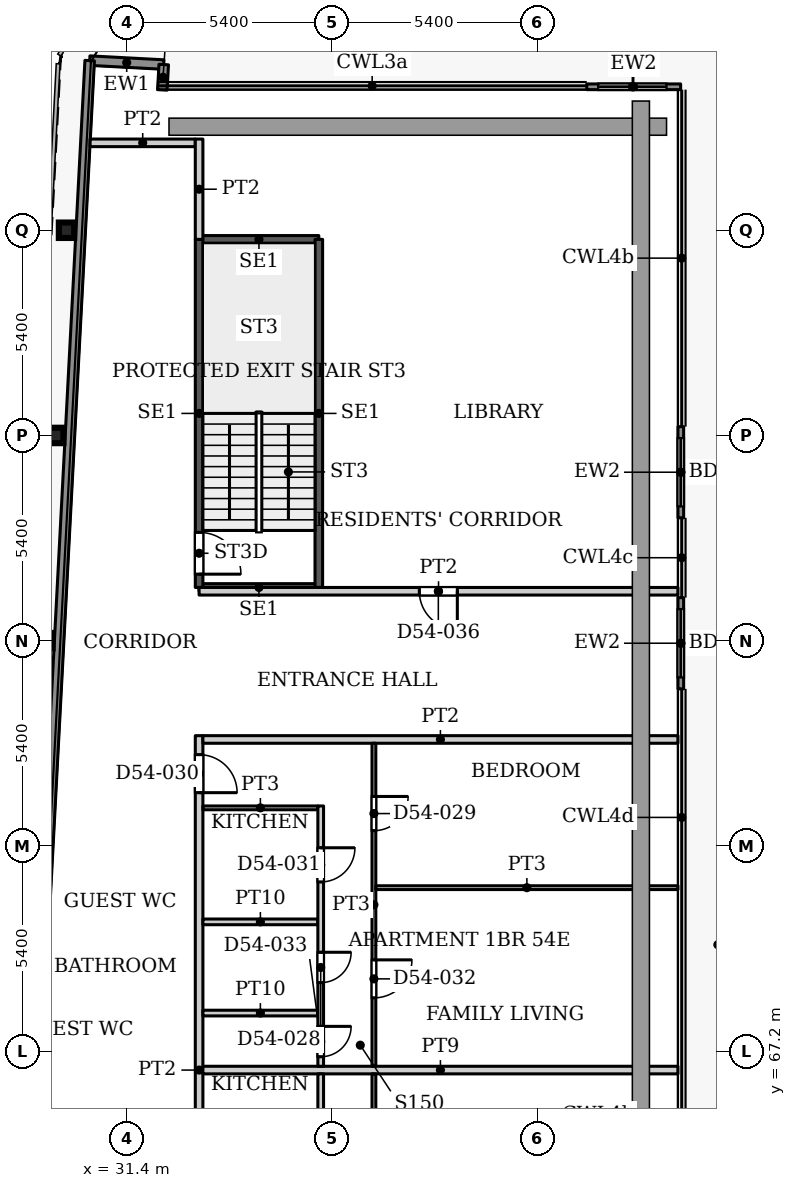
"""IFC4 building model, lengths in metres.
Left out: names, types, materials, properties, quantities, classifications, styles, units other than length and angle.
Written with IfcOpenShell. Run it as: python <this file> out.ifc"""

import sys

from ifc_helpers import new_model, si_unit, direction, frame, frame_2d, origin, origin_2d, place, context, subcontext, project, spatial, rectangle, i_section, extrude, source, transform, mapped, element, fill, save


model = new_model("IFC4")
c1 = context("Model", 3, precision=1e-05, world=origin(), true_north=direction((0.0, 1.0)))
c2 = subcontext(c1, "Body", "Model", "MODEL_VIEW")
j1 = project(units=[si_unit("LENGTHUNIT", "METRE"), si_unit("PLANEANGLEUNIT", "RADIAN")], contexts=[c1])
p1 = place(None, origin())
s1 = spatial("IfcSite", under=j1, at=p1, CompositionType="ELEMENT")
p2 = place(p1, origin())
s2 = spatial("IfcBuilding", under=s1, at=p2, CompositionType="ELEMENT")
p3 = place(p2, frame((0.0, 0.0, 231.8)))
s3 = spatial("IfcBuildingStorey", under=s2, at=p3, CompositionType="ELEMENT", Elevation=231.8)
for number, where, z_axis, x_axis in (
    (1, (29.243, 78.0, 0.0), (0.0, 0.0, 1.0), (1.0, 0.0, 0.0)),
    (2, (29.527, 83.4, 0.0), (0.0, 0.0, 1.0), (1.0, 0.0, 0.0)),
    (3, (29.811, 88.8, 0.0), (0.0, 0.0, 1.0), (1.0, 0.0, 0.0)),
):
    element("IfcColumn", number, at=place(p3, frame(where, z_axis=z_axis, x_axis=x_axis)), inside=s3, PredefinedType="COLUMN", context=c2, shape_type="SweptSolid", body=[
        extrude(i_section(OverallWidth=0.404, OverallDepth=0.407, WebThickness=0.027, FlangeThickness=0.044, FilletRadius=0.012, at=origin_2d()), origin(), (0.0, 0.0, 1.0), 3.9),
    ])
p4 = place(p3, frame((30.421, 93.264, 0.0), z_axis=(0.0, 0.0, 1.0), x_axis=(0.998577785791, -0.053314216913, 0.0)))
e4 = element("IfcWall", 4, at=p4, inside=s3, PredefinedType="SOLIDWALL", context=c2, shape_type="SweptSolid", body=[
    extrude(rectangle(XDim=1.951, YDim=0.25, at=frame_2d((0.975, 0.0))), origin(), (0.0, 0.0, 1.0), 3.75),
])
p5 = place(p3, frame((32.369, 93.16, 0.0), z_axis=(0.0, 0.0, 1.0), x_axis=(-0.053729014033, -0.998555553312, 0.0)))
e5 = element("IfcWall", 5, at=p5, inside=s3, PredefinedType="SOLIDWALL", context=c2, shape_type="SweptSolid", body=[
    extrude(rectangle(XDim=0.668, YDim=0.25, at=frame_2d((0.334, 0.0))), origin(), (0.0, 0.0, 1.0), 3.75),
])
p6 = place(p3, frame((43.5, 92.575, 0.0), z_axis=(0.0, 0.0, 1.0), x_axis=(1.0, 0.0, 0.0)))
e6 = element("IfcWall", 6, at=p6, inside=s3, PredefinedType="SOLIDWALL", context=c2, shape_type="SweptSolid", body=[
    extrude(rectangle(XDim=2.471, YDim=0.15, at=frame_2d((1.235, 0.0))), origin(), (0.0, 0.0, 1.0), 3.75),
])
p7 = place(p6, frame((0.3, 0.0, 0.0)))
e7 = element("IfcOpeningElement", 7, at=p7, cuts=e6, PredefinedType="OPENING", context=c2, shape_type="SweptSolid", body=[
    extrude(rectangle(XDim=1.8, YDim=2.4, at=frame_2d((0.9, 1.2))), frame((0.0, 0.085, 0.0), z_axis=(0.0, -1.0, 0.0), x_axis=(1.0, 0.0, 0.0)), (0.0, 0.0, 1.0), 0.17),
])
p8 = place(p3, frame((45.975, 83.632, 0.0), z_axis=(0.0, 0.0, 1.0), x_axis=(0.0, -1.0, 0.0)))
e8 = element("IfcWall", 8, at=p8, inside=s3, PredefinedType="SOLIDWALL", context=c2, shape_type="SweptSolid", body=[
    extrude(rectangle(XDim=2.399, YDim=0.15, at=frame_2d((1.2, 0.0))), origin(), (0.0, 0.0, 1.0), 3.75),
])
p9 = place(p8, frame((0.3, 0.0, 0.0)))
e9 = element("IfcOpeningElement", 9, at=p9, cuts=e8, PredefinedType="OPENING", context=c2, shape_type="SweptSolid", body=[
    extrude(rectangle(XDim=1.8, YDim=2.4, at=frame_2d((0.9, 1.2))), frame((0.0, 0.085, 0.0), z_axis=(0.0, -1.0, 0.0), x_axis=(1.0, 0.0, 0.0)), (0.0, 0.0, 1.0), 0.17),
])
p10 = place(p3, frame((45.975, 79.132, 0.0), z_axis=(0.0, 0.0, 1.0), x_axis=(0.0, -1.0, 0.0)))
e10 = element("IfcWall", 10, at=p10, inside=s3, PredefinedType="SOLIDWALL", context=c2, shape_type="SweptSolid", body=[
    extrude(rectangle(XDim=2.399, YDim=0.15, at=frame_2d((1.2, 0.0))), origin(), (0.0, 0.0, 1.0), 3.75),
])
p11 = place(p10, frame((0.3, 0.0, 0.0)))
e11 = element("IfcOpeningElement", 11, at=p11, cuts=e10, PredefinedType="OPENING", context=c2, shape_type="SweptSolid", body=[
    extrude(rectangle(XDim=1.8, YDim=2.4, at=frame_2d((0.9, 1.2))), frame((0.0, 0.085, 0.0), z_axis=(0.0, -1.0, 0.0), x_axis=(1.0, 0.0, 0.0)), (0.0, 0.0, 1.0), 0.17),
])
p12 = place(p3, frame((27.195, 31.969, 0.0), z_axis=(0.0, 0.0, 1.0), x_axis=(0.052555284099, 0.998618016117, 0.0)))
e12 = element("IfcWall", 12, at=p12, inside=s3, PredefinedType="SOLIDWALL", context=c2, shape_type="SweptSolid", body=[
    extrude(rectangle(XDim=61.38, YDim=0.25, at=frame_2d((30.69, 0.0))), origin(), (0.0, 0.0, 1.0), 3.75),
])
for number, where, z_axis, x_axis in (
    (13, (33.3, 79.4, 0.0), (0.0, 0.0, 1.0), (1.0, 0.0, 0.0)),
    (14, (33.3, 88.56, 0.0), (0.0, 0.0, 1.0), (1.0, 0.0, 0.0)),
):
    element("IfcWall", number, at=place(p3, frame(where, z_axis=z_axis, x_axis=x_axis)), inside=s3, PredefinedType="SHEAR", context=c2, shape_type="SweptSolid", body=[
        extrude(rectangle(XDim=3.15, YDim=0.2, at=frame_2d((1.575, 0.0))), origin(), (0.0, 0.0, 1.0), 3.9),
    ])
p13 = place(p3, frame((33.3, 79.4, 0.0), z_axis=(0.0, 0.0, 1.0), x_axis=(0.0, 1.0, 0.0)))
e15 = element("IfcWall", 15, at=p13, inside=s3, PredefinedType="SHEAR", context=c2, shape_type="SweptSolid", body=[
    extrude(rectangle(XDim=9.16, YDim=0.2, at=frame_2d((4.58, 0.0))), origin(), (0.0, 0.0, 1.0), 3.9),
])
p14 = place(p13, frame((0.35, 0.0, 0.0)))
e16 = element("IfcOpeningElement", 16, at=p14, cuts=e15, PredefinedType="OPENING", context=c2, shape_type="SweptSolid", body=[
    extrude(rectangle(XDim=1.1, YDim=2.2, at=frame_2d((0.55, 1.1))), frame((0.0, 0.11, 0.0), z_axis=(0.0, -1.0, 0.0), x_axis=(1.0, 0.0, 0.0)), (0.0, 0.0, 1.0), 0.22),
])
p15 = place(p3, frame((36.45, 79.4, 0.0), z_axis=(0.0, 0.0, 1.0), x_axis=(0.0, 1.0, 0.0)))
e17 = element("IfcWall", 17, at=p15, inside=s3, PredefinedType="SHEAR", context=c2, shape_type="SweptSolid", body=[
    extrude(rectangle(XDim=9.16, YDim=0.2, at=frame_2d((4.58, 0.0))), origin(), (0.0, 0.0, 1.0), 3.9),
])
p16 = place(p3, frame((30.432, 91.1, 0.0), z_axis=(0.0, 0.0, 1.0), x_axis=(1.0, 0.0, 0.0)))
e18 = element("IfcWall", 18, at=p16, inside=s3, PredefinedType="PARTITIONING", context=c2, shape_type="SweptSolid", body=[
    extrude(rectangle(XDim=2.768, YDim=0.2, at=frame_2d((1.384, 0.0))), origin(), (0.0, 0.0, 1.0), 3.6),
])
p17 = place(p3, frame((33.3, 57.9, 0.0), z_axis=(0.0, 0.0, 1.0), x_axis=(0.0, 1.0, 0.0)))
e19 = element("IfcWall", 19, at=p17, inside=s3, PredefinedType="PARTITIONING", context=c2, shape_type="SweptSolid", body=[
    extrude(rectangle(XDim=17.6, YDim=0.2, at=frame_2d((8.8, 0.0))), origin(), (0.0, 0.0, 1.0), 3.6),
])
p18 = place(p17, frame((0.5, 0.0, 0.0)))
e20 = element("IfcOpeningElement", 20, at=p18, cuts=e19, PredefinedType="OPENING", context=c2, shape_type="SweptSolid", body=[
    extrude(rectangle(XDim=1.0, YDim=2.1, at=frame_2d((0.5, 1.05))), frame((0.0, 0.11, 0.0), z_axis=(0.0, -1.0, 0.0), x_axis=(1.0, 0.0, 0.0)), (0.0, 0.0, 1.0), 0.22),
])
p19 = place(p17, frame((16.1, 0.0, 0.0)))
e21 = element("IfcOpeningElement", 21, at=p19, cuts=e19, PredefinedType="OPENING", context=c2, shape_type="SweptSolid", body=[
    extrude(rectangle(XDim=1.0, YDim=2.1, at=frame_2d((0.5, 1.05))), frame((0.0, 0.11, 0.0), z_axis=(0.0, -1.0, 0.0), x_axis=(1.0, 0.0, 0.0)), (0.0, 0.0, 1.0), 0.22),
])
p20 = place(p3, frame((33.3, 79.3, 0.0), z_axis=(0.0, 0.0, 1.0), x_axis=(1.0, 0.0, 0.0)))
e22 = element("IfcWall", 22, at=p20, inside=s3, PredefinedType="PARTITIONING", context=c2, shape_type="SweptSolid", body=[
    extrude(rectangle(XDim=12.6, YDim=0.2, at=frame_2d((6.3, 0.0))), origin(), (0.0, 0.0, 1.0), 3.6),
])
p21 = place(p20, frame((5.795, 0.0, 0.0)))
e23 = element("IfcOpeningElement", 23, at=p21, cuts=e22, PredefinedType="OPENING", context=c2, shape_type="SweptSolid", body=[
    extrude(rectangle(XDim=1.0, YDim=2.1, at=frame_2d((0.5, 1.05))), frame((0.0, 0.11, 0.0), z_axis=(0.0, -1.0, 0.0), x_axis=(1.0, 0.0, 0.0)), (0.0, 0.0, 1.0), 0.22),
])
p22 = place(p3, frame((33.3, 88.56, 0.0), z_axis=(0.0, 0.0, 1.0), x_axis=(0.0, 1.0, 0.0)))
e24 = element("IfcWall", 24, at=p22, inside=s3, PredefinedType="PARTITIONING", context=c2, shape_type="SweptSolid", body=[
    extrude(rectangle(XDim=2.64, YDim=0.2, at=frame_2d((1.32, 0.0))), origin(), (0.0, 0.0, 1.0), 3.6),
])
p23 = place(p3, frame((33.4, 66.7, 0.0), z_axis=(0.0, 0.0, 1.0), x_axis=(1.0, 0.0, 0.0)))
e25 = element("IfcWall", 25, at=p23, inside=s3, PredefinedType="PARTITIONING", context=c2, shape_type="SweptSolid", body=[
    extrude(rectangle(XDim=12.5, YDim=0.2, at=frame_2d((6.25, 0.0))), origin(), (0.0, 0.0, 1.0), 3.6),
])
for number, where, z_axis, x_axis in (
    (26, (33.4, 68.2, 0.0), (0.0, 0.0, 1.0), (1.0, 0.0, 0.0)),
    (27, (33.4, 70.6, 0.0), (0.0, 0.0, 1.0), (1.0, 0.0, 0.0)),
):
    element("IfcWall", number, at=place(p3, frame(where, z_axis=z_axis, x_axis=x_axis)), inside=s3, PredefinedType="PARTITIONING", context=c2, shape_type="SweptSolid", body=[
        extrude(rectangle(XDim=3.025, YDim=0.15, at=frame_2d((1.513, 0.0))), origin(), (0.0, 0.0, 1.0), 3.6),
    ])
p24 = place(p3, frame((33.4, 73.6, 0.0), z_axis=(0.0, 0.0, 1.0), x_axis=(1.0, 0.0, 0.0)))
e28 = element("IfcWall", 28, at=p24, inside=s3, PredefinedType="PARTITIONING", context=c2, shape_type="SweptSolid", body=[
    extrude(rectangle(XDim=3.025, YDim=0.1, at=frame_2d((1.513, 0.0))), origin(), (0.0, 0.0, 1.0), 3.6),
])
p25 = place(p3, frame((33.4, 75.4, 0.0), z_axis=(0.0, 0.0, 1.0), x_axis=(1.0, 0.0, 0.0)))
e29 = element("IfcWall", 29, at=p25, inside=s3, PredefinedType="PARTITIONING", context=c2, shape_type="SweptSolid", body=[
    extrude(rectangle(XDim=12.5, YDim=0.2, at=frame_2d((6.25, 0.0))), origin(), (0.0, 0.0, 1.0), 3.6),
])
p26 = place(p3, frame((36.5, 59.725, 0.0), z_axis=(0.0, 0.0, 1.0), x_axis=(0.0, 1.0, 0.0)))
e30 = element("IfcWall", 30, at=p26, inside=s3, PredefinedType="PARTITIONING", context=c2, shape_type="SweptSolid", body=[
    extrude(rectangle(XDim=6.875, YDim=0.15, at=frame_2d((3.438, 0.0))), origin(), (0.0, 0.0, 1.0), 3.6),
])
p27 = place(p26, frame((0.875, 0.0, 0.0)))
e31 = element("IfcOpeningElement", 31, at=p27, cuts=e30, PredefinedType="OPENING", context=c2, shape_type="SweptSolid", body=[
    extrude(rectangle(XDim=0.8, YDim=2.1, at=frame_2d((0.4, 1.05))), frame((0.0, 0.085, 0.0), z_axis=(0.0, -1.0, 0.0), x_axis=(1.0, 0.0, 0.0)), (0.0, 0.0, 1.0), 0.17),
])
p28 = place(p26, frame((5.025, 0.0, 0.0)))
e32 = element("IfcOpeningElement", 32, at=p28, cuts=e30, PredefinedType="OPENING", context=c2, shape_type="SweptSolid", body=[
    extrude(rectangle(XDim=0.9, YDim=2.1, at=frame_2d((0.45, 1.05))), frame((0.0, 0.085, 0.0), z_axis=(0.0, -1.0, 0.0), x_axis=(1.0, 0.0, 0.0)), (0.0, 0.0, 1.0), 0.17),
])
p29 = place(p26, frame((2.825, 0.0, 0.0)))
e33 = element("IfcOpeningElement", 33, at=p29, cuts=e30, PredefinedType="OPENING", context=c2, shape_type="SweptSolid", body=[
    extrude(rectangle(XDim=0.8, YDim=2.1, at=frame_2d((0.4, 1.05))), frame((0.0, 0.085, 0.0), z_axis=(0.0, -1.0, 0.0), x_axis=(1.0, 0.0, 0.0)), (0.0, 0.0, 1.0), 0.17),
])
p30 = place(p3, frame((36.5, 66.8, 0.0), z_axis=(0.0, 0.0, 1.0), x_axis=(0.0, 1.0, 0.0)))
e34 = element("IfcWall", 34, at=p30, inside=s3, PredefinedType="PARTITIONING", context=c2, shape_type="SweptSolid", body=[
    extrude(rectangle(XDim=6.85, YDim=0.15, at=frame_2d((3.425, 0.0))), origin(), (0.0, 0.0, 1.0), 3.6),
])
p31 = place(p30, frame((2.2, 0.0, 0.0)))
e35 = element("IfcOpeningElement", 35, at=p31, cuts=e34, PredefinedType="OPENING", context=c2, shape_type="SweptSolid", body=[
    extrude(rectangle(XDim=0.8, YDim=2.1, at=frame_2d((0.4, 1.05))), frame((0.0, 0.085, 0.0), z_axis=(0.0, -1.0, 0.0), x_axis=(1.0, 0.0, 0.0)), (0.0, 0.0, 1.0), 0.17),
])
p32 = place(p30, frame((4.85, 0.0, 0.0)))
e36 = element("IfcOpeningElement", 36, at=p32, cuts=e34, PredefinedType="OPENING", context=c2, shape_type="SweptSolid", body=[
    extrude(rectangle(XDim=0.9, YDim=2.1, at=frame_2d((0.45, 1.05))), frame((0.0, 0.085, 0.0), z_axis=(0.0, -1.0, 0.0), x_axis=(1.0, 0.0, 0.0)), (0.0, 0.0, 1.0), 0.17),
])
p33 = place(p30, frame((0.25, 0.0, 0.0)))
e37 = element("IfcOpeningElement", 37, at=p33, cuts=e34, PredefinedType="OPENING", context=c2, shape_type="SweptSolid", body=[
    extrude(rectangle(XDim=0.8, YDim=2.1, at=frame_2d((0.4, 1.05))), frame((0.0, 0.085, 0.0), z_axis=(0.0, -1.0, 0.0), x_axis=(1.0, 0.0, 0.0)), (0.0, 0.0, 1.0), 0.17),
])
p34 = place(p3, frame((37.9, 58.1, 0.0), z_axis=(0.0, 0.0, 1.0), x_axis=(0.0, 1.0, 0.0)))
e38 = element("IfcWall", 38, at=p34, inside=s3, PredefinedType="PARTITIONING", context=c2, shape_type="SweptSolid", body=[
    extrude(rectangle(XDim=8.5, YDim=0.1, at=frame_2d((4.25, 0.0))), origin(), (0.0, 0.0, 1.0), 3.6),
])
p35 = place(p34, frame((1.4, 0.0, 0.0)))
e39 = element("IfcOpeningElement", 39, at=p35, cuts=e38, PredefinedType="OPENING", context=c2, shape_type="SweptSolid", body=[
    extrude(rectangle(XDim=0.9, YDim=2.1, at=frame_2d((0.45, 1.05))), frame((0.0, 0.06, 0.0), z_axis=(0.0, -1.0, 0.0), x_axis=(1.0, 0.0, 0.0)), (0.0, 0.0, 1.0), 0.12),
])
p36 = place(p34, frame((5.7, 0.0, 0.0)))
e40 = element("IfcOpeningElement", 40, at=p36, cuts=e38, PredefinedType="OPENING", context=c2, shape_type="SweptSolid", body=[
    extrude(rectangle(XDim=1.0, YDim=2.1, at=frame_2d((0.5, 1.05))), frame((0.0, 0.06, 0.0), z_axis=(0.0, -1.0, 0.0), x_axis=(1.0, 0.0, 0.0)), (0.0, 0.0, 1.0), 0.12),
])
p37 = place(p3, frame((37.9, 66.8, 0.0), z_axis=(0.0, 0.0, 1.0), x_axis=(0.0, 1.0, 0.0)))
e41 = element("IfcWall", 41, at=p37, inside=s3, PredefinedType="PARTITIONING", context=c2, shape_type="SweptSolid", body=[
    extrude(rectangle(XDim=8.5, YDim=0.1, at=frame_2d((4.25, 0.0))), origin(), (0.0, 0.0, 1.0), 3.6),
])
p38 = place(p37, frame((6.2, 0.0, 0.0)))
e42 = element("IfcOpeningElement", 42, at=p38, cuts=e41, PredefinedType="OPENING", context=c2, shape_type="SweptSolid", body=[
    extrude(rectangle(XDim=0.9, YDim=2.1, at=frame_2d((0.45, 1.05))), frame((0.0, 0.06, 0.0), z_axis=(0.0, -1.0, 0.0), x_axis=(1.0, 0.0, 0.0)), (0.0, 0.0, 1.0), 0.12),
])
p39 = place(p37, frame((1.8, 0.0, 0.0)))
e43 = element("IfcOpeningElement", 43, at=p39, cuts=e41, PredefinedType="OPENING", context=c2, shape_type="SweptSolid", body=[
    extrude(rectangle(XDim=1.0, YDim=2.1, at=frame_2d((0.5, 1.05))), frame((0.0, 0.06, 0.0), z_axis=(0.0, -1.0, 0.0), x_axis=(1.0, 0.0, 0.0)), (0.0, 0.0, 1.0), 0.12),
])
p40 = place(p3, frame((37.95, 71.5, 0.0), z_axis=(0.0, 0.0, 1.0), x_axis=(1.0, 0.0, 0.0)))
e44 = element("IfcWall", 44, at=p40, inside=s3, PredefinedType="PARTITIONING", context=c2, shape_type="SweptSolid", body=[
    extrude(rectangle(XDim=7.95, YDim=0.1, at=frame_2d((3.975, 0.0))), origin(), (0.0, 0.0, 1.0), 3.6),
])
m1 = source(origin(), c2, "Body", "SweptSolid", [
    extrude(rectangle(XDim=1.8, YDim=2.4, at=frame_2d((0.9, 1.2))), frame((0.0, 0.025, 0.0), z_axis=(0.0, -1.0, 0.0), x_axis=(1.0, 0.0, 0.0)), (0.0, 0.0, 1.0), 0.05),
])
p41 = place(p7, origin())
e45 = element("IfcDoor", 45, at=p41, inside=s3, OperationType="SLIDING_TO_LEFT", PredefinedType="DOOR", context=c2, shape_type="MappedRepresentation", body=[
    mapped(m1, transform((0.0, 0.0, 0.0), x_axis=(1.0, 0.0, 0.0), y_axis=(0.0, 1.0, 0.0), z_axis=(0.0, 0.0, 1.0), scale=1.0)),
])
fill(e7, e45)
p42 = place(p9, origin())
e46 = element("IfcDoor", 46, at=p42, inside=s3, OperationType="SLIDING_TO_LEFT", PredefinedType="DOOR", context=c2, shape_type="MappedRepresentation", body=[
    mapped(m1, transform((0.0, 0.0, 0.0), x_axis=(1.0, 0.0, 0.0), y_axis=(0.0, 1.0, 0.0), z_axis=(0.0, 0.0, 1.0), scale=1.0)),
])
fill(e9, e46)
p43 = place(p11, origin())
e47 = element("IfcDoor", 47, at=p43, inside=s3, OperationType="SLIDING_TO_LEFT", PredefinedType="DOOR", context=c2, shape_type="MappedRepresentation", body=[
    mapped(m1, transform((0.0, 0.0, 0.0), x_axis=(1.0, 0.0, 0.0), y_axis=(0.0, 1.0, 0.0), z_axis=(0.0, 0.0, 1.0), scale=1.0)),
])
fill(e11, e47)
m2 = source(origin(), c2, "Body", "SweptSolid", [
    extrude(rectangle(XDim=1.1, YDim=2.2, at=frame_2d((0.55, 1.1))), frame((0.0, 0.025, 0.0), z_axis=(0.0, -1.0, 0.0), x_axis=(1.0, 0.0, 0.0)), (0.0, 0.0, 1.0), 0.05),
])
p44 = place(p14, origin())
e48 = element("IfcDoor", 48, at=p44, inside=s3, OperationType="SINGLE_SWING_RIGHT", PredefinedType="DOOR", context=c2, shape_type="MappedRepresentation", body=[
    mapped(m2, transform((0.0, 0.0, 0.0), x_axis=(1.0, 0.0, 0.0), y_axis=(0.0, 1.0, 0.0), z_axis=(0.0, 0.0, 1.0), scale=1.0)),
])
fill(e16, e48)
m3 = source(origin(), c2, "Body", "SweptSolid", [
    extrude(rectangle(XDim=0.8, YDim=2.1, at=frame_2d((0.4, 1.05))), frame((0.0, 0.025, 0.0), z_axis=(0.0, -1.0, 0.0), x_axis=(1.0, 0.0, 0.0)), (0.0, 0.0, 1.0), 0.05),
])
p45 = place(p31, origin())
e49 = element("IfcDoor", 49, at=p45, inside=s3, OperationType="SINGLE_SWING_RIGHT", PredefinedType="DOOR", context=c2, shape_type="MappedRepresentation", body=[
    mapped(m3, transform((0.0, 0.0, 0.0), x_axis=(1.0, 0.0, 0.0), y_axis=(0.0, 1.0, 0.0), z_axis=(0.0, 0.0, 1.0), scale=1.0)),
])
fill(e35, e49)
m4 = source(origin(), c2, "Body", "SweptSolid", [
    extrude(rectangle(XDim=0.9, YDim=2.1, at=frame_2d((0.45, 1.05))), frame((0.0, 0.025, 0.0), z_axis=(0.0, -1.0, 0.0), x_axis=(1.0, 0.0, 0.0)), (0.0, 0.0, 1.0), 0.05),
])
p46 = place(p38, origin())
e50 = element("IfcDoor", 50, at=p46, inside=s3, OperationType="SINGLE_SWING_RIGHT", PredefinedType="DOOR", context=c2, shape_type="MappedRepresentation", body=[
    mapped(m4, transform((0.0, 0.0, 0.0), x_axis=(1.0, 0.0, 0.0), y_axis=(0.0, 1.0, 0.0), z_axis=(0.0, 0.0, 1.0), scale=1.0)),
])
fill(e42, e50)
m5 = source(origin(), c2, "Body", "SweptSolid", [
    extrude(rectangle(XDim=1.0, YDim=2.1, at=frame_2d((0.5, 1.05))), frame((0.0, 0.025, 0.0), z_axis=(0.0, -1.0, 0.0), x_axis=(1.0, 0.0, 0.0)), (0.0, 0.0, 1.0), 0.05),
])
p47 = place(p19, origin())
e51 = element("IfcDoor", 51, at=p47, inside=s3, OperationType="SINGLE_SWING_RIGHT", PredefinedType="DOOR", context=c2, shape_type="MappedRepresentation", body=[
    mapped(m5, transform((0.0, 0.0, 0.0), x_axis=(1.0, 0.0, 0.0), y_axis=(0.0, 1.0, 0.0), z_axis=(0.0, 0.0, 1.0), scale=1.0)),
])
fill(e21, e51)
p48 = place(p32, origin())
e52 = element("IfcDoor", 52, at=p48, inside=s3, OperationType="SINGLE_SWING_RIGHT", PredefinedType="DOOR", context=c2, shape_type="MappedRepresentation", body=[
    mapped(m4, transform((0.0, 0.0, 0.0), x_axis=(1.0, 0.0, 0.0), y_axis=(0.0, 1.0, 0.0), z_axis=(0.0, 0.0, 1.0), scale=1.0)),
])
fill(e36, e52)
m6 = source(origin(), c2, "Body", "SweptSolid", [
    extrude(rectangle(XDim=1.0, YDim=2.1, at=frame_2d((0.5, 1.05))), frame((0.0, 0.025, 0.0), z_axis=(0.0, -1.0, 0.0), x_axis=(1.0, 0.0, 0.0)), (0.0, 0.0, 1.0), 0.05),
])
p49 = place(p39, origin())
e53 = element("IfcDoor", 53, at=p49, inside=s3, OperationType="SINGLE_SWING_RIGHT", PredefinedType="DOOR", context=c2, shape_type="MappedRepresentation", body=[
    mapped(m6, transform((0.0, 0.0, 0.0), x_axis=(1.0, 0.0, 0.0), y_axis=(0.0, 1.0, 0.0), z_axis=(0.0, 0.0, 1.0), scale=1.0)),
])
fill(e43, e53)
p50 = place(p33, origin())
e54 = element("IfcDoor", 54, at=p50, inside=s3, OperationType="SINGLE_SWING_RIGHT", PredefinedType="DOOR", context=c2, shape_type="MappedRepresentation", body=[
    mapped(m3, transform((0.0, 0.0, 0.0), x_axis=(1.0, 0.0, 0.0), y_axis=(0.0, 1.0, 0.0), z_axis=(0.0, 0.0, 1.0), scale=1.0)),
])
fill(e37, e54)
m7 = source(origin(), c2, "Body", "SweptSolid", [
    extrude(rectangle(XDim=1.0, YDim=2.1, at=frame_2d((0.5, 1.05))), frame((0.0, 0.025, 0.0), z_axis=(0.0, -1.0, 0.0), x_axis=(1.0, 0.0, 0.0)), (0.0, 0.0, 1.0), 0.05),
])
p51 = place(p21, origin())
e55 = element("IfcDoor", 55, at=p51, inside=s3, OperationType="SINGLE_SWING_RIGHT", PredefinedType="DOOR", context=c2, shape_type="MappedRepresentation", body=[
    mapped(m7, transform((0.0, 0.0, 0.0), x_axis=(1.0, 0.0, 0.0), y_axis=(0.0, 1.0, 0.0), z_axis=(0.0, 0.0, 1.0), scale=1.0)),
])
fill(e23, e55)
save(model, sys.argv[1])
